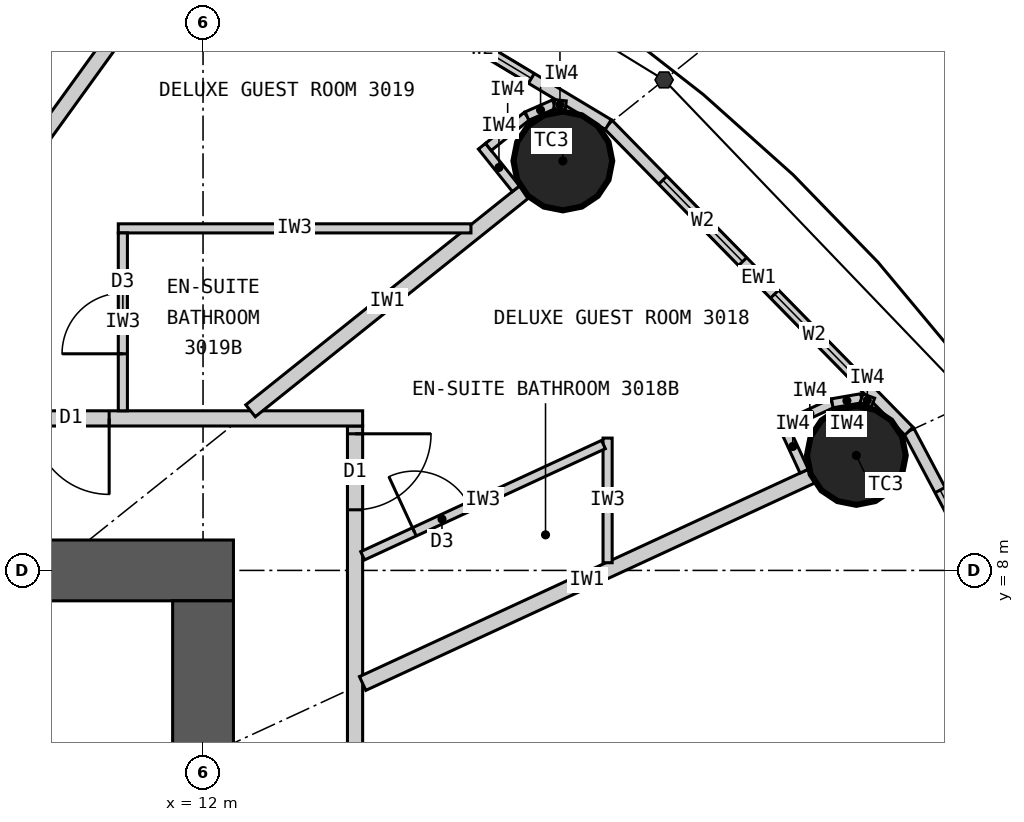
"""IFC4 building model, lengths in metres.
Left out: names, types, materials, properties, quantities, classifications, styles, units other than length and angle.
Written with IfcOpenShell. Run it as: python <this file> out.ifc"""

import sys

from ifc_helpers import new_model, si_unit, direction, frame, frame_2d, origin, origin_2d, place, context, subcontext, project, spatial, rectangle, circle, extrude, element, fill, save


model = new_model("IFC4")
c1 = context("Model", 3, precision=1e-05, world=origin(), true_north=direction((0.0, 1.0)))
c2 = subcontext(c1, "Body", "Model", "MODEL_VIEW")
j1 = project(units=[si_unit("LENGTHUNIT", "METRE"), si_unit("PLANEANGLEUNIT", "RADIAN")], contexts=[c1])
p1 = place(None, origin())
s1 = spatial("IfcSite", under=j1, at=p1, CompositionType="ELEMENT")
p2 = place(p1, origin())
s2 = spatial("IfcBuilding", under=s1, at=p2, CompositionType="ELEMENT")
p3 = place(p2, frame((0.0, 0.0, 118.8)))
s3 = spatial("IfcBuildingStorey", under=s2, at=p3, CompositionType="ELEMENT", Elevation=118.8)
for number, where, z_axis, x_axis in (
    (1, (20.596, 9.513, 0.0), (0.0, 0.0, 1.0), (1.0, 0.0, 0.0)),
    (2, (16.734, 13.387, 0.0), (0.0, 0.0, 1.0), (1.0, 0.0, 0.0)),
):
    element("IfcColumn", number, at=place(p3, frame(where, z_axis=z_axis, x_axis=x_axis)), inside=s3, PredefinedType="COLUMN", context=c2, shape_type="SweptSolid", body=[
        extrude(circle(Radius=0.65, at=origin_2d()), origin(), (0.0, 0.0, 1.0), 3.3),
    ])
p4 = place(p3, frame((-12.4, 8.0, 0.0), z_axis=(0.0, 0.0, 1.0), x_axis=(1.0, 0.0, 0.0)))
e3 = element("IfcWall", 3, at=p4, inside=s3, PredefinedType="SHEAR", context=c2, shape_type="SweptSolid", body=[
    extrude(rectangle(XDim=24.8, YDim=0.8, at=frame_2d((12.4, 0.0))), origin(), (0.0, 0.0, 1.0), 3.3),
])
p5 = place(p4, frame((11.1, 0.0, 0.0)))
e4 = element("IfcOpeningElement", 4, at=p5, cuts=e3, PredefinedType="OPENING", context=c2, shape_type="SweptSolid", body=[
    extrude(rectangle(XDim=1.2, YDim=2.2, at=frame_2d((0.6, 1.1))), frame((0.0, 0.41, 0.0), z_axis=(0.0, -1.0, 0.0), x_axis=(1.0, 0.0, 0.0)), (0.0, 0.0, 1.0), 0.82),
])
p6 = place(p4, frame((18.7, 0.0, 0.0)))
e5 = element("IfcOpeningElement", 5, at=p6, cuts=e3, PredefinedType="OPENING", context=c2, shape_type="SweptSolid", body=[
    extrude(rectangle(XDim=0.9, YDim=2.2, at=frame_2d((0.45, 1.1))), frame((0.0, 0.41, 0.0), z_axis=(0.0, -1.0, 0.0), x_axis=(1.0, 0.0, 0.0)), (0.0, 0.0, 1.0), 0.82),
])
p7 = place(p3, frame((12.0, -7.6, 0.0), z_axis=(0.0, 0.0, 1.0), x_axis=(0.0, 1.0, 0.0)))
e6 = element("IfcWall", 6, at=p7, inside=s3, PredefinedType="SHEAR", context=c2, shape_type="SweptSolid", body=[
    extrude(rectangle(XDim=15.2, YDim=0.8, at=frame_2d((7.6, 0.0))), origin(), (0.0, 0.0, 1.0), 3.3),
])
p8 = place(p7, frame((6.7, 0.0, 0.0)))
e7 = element("IfcOpeningElement", 7, at=p8, cuts=e6, PredefinedType="OPENING", context=c2, shape_type="SweptSolid", body=[
    extrude(rectangle(XDim=1.8, YDim=2.2, at=frame_2d((0.9, 1.1))), frame((0.0, 0.41, 0.0), z_axis=(0.0, -1.0, 0.0), x_axis=(1.0, 0.0, 0.0)), (0.0, 0.0, 1.0), 0.82),
])
p9 = place(p3, frame((23.792, 5.1, 0.0), z_axis=(0.0, 0.0, 1.0), x_axis=(-0.467814388454, 0.883826735257, 0.0)))
e8 = element("IfcWall", 8, at=p9, inside=s3, PredefinedType="ELEMENTEDWALL", context=c2, shape_type="SweptSolid", body=[
    extrude(rectangle(XDim=5.354, YDim=0.15, at=frame_2d((2.677, 0.0))), origin(), (0.0, 0.0, 1.0), 3.12),
])
p10 = place(p9, frame((0.877, 0.0, 0.9)))
e9 = element("IfcOpeningElement", 9, at=p10, cuts=e8, PredefinedType="OPENING", context=c2, shape_type="SweptSolid", body=[
    extrude(rectangle(XDim=1.5, YDim=1.9, at=frame_2d((0.75, 0.95))), frame((0.0, 0.085, 0.0), z_axis=(0.0, -1.0, 0.0), x_axis=(1.0, 0.0, 0.0)), (0.0, 0.0, 1.0), 0.17),
])
p11 = place(p9, frame((2.977, 0.0, 0.9)))
e10 = element("IfcOpeningElement", 10, at=p11, cuts=e8, PredefinedType="OPENING", context=c2, shape_type="SweptSolid", body=[
    extrude(rectangle(XDim=1.5, YDim=1.9, at=frame_2d((0.75, 0.95))), frame((0.0, 0.085, 0.0), z_axis=(0.0, -1.0, 0.0), x_axis=(1.0, 0.0, 0.0)), (0.0, 0.0, 1.0), 0.17),
])
p12 = place(p3, frame((21.287, 9.832, 0.0), z_axis=(0.0, 0.0, 1.0), x_axis=(-0.700136650834, 0.714008872605, 0.0)))
e11 = element("IfcWall", 11, at=p12, inside=s3, PredefinedType="ELEMENTEDWALL", context=c2, shape_type="SweptSolid", body=[
    extrude(rectangle(XDim=5.649, YDim=0.15, at=frame_2d((2.825, 0.0))), origin(), (0.0, 0.0, 1.0), 3.12),
])
p13 = place(p12, frame((1.025, 0.0, 0.9)))
e12 = element("IfcOpeningElement", 12, at=p13, cuts=e11, PredefinedType="OPENING", context=c2, shape_type="SweptSolid", body=[
    extrude(rectangle(XDim=1.5, YDim=1.9, at=frame_2d((0.75, 0.95))), frame((0.0, 0.085, 0.0), z_axis=(0.0, -1.0, 0.0), x_axis=(1.0, 0.0, 0.0)), (0.0, 0.0, 1.0), 0.17),
])
p14 = place(p12, frame((3.125, 0.0, 0.9)))
e13 = element("IfcOpeningElement", 13, at=p14, cuts=e11, PredefinedType="OPENING", context=c2, shape_type="SweptSolid", body=[
    extrude(rectangle(XDim=1.5, YDim=1.9, at=frame_2d((0.75, 0.95))), frame((0.0, 0.085, 0.0), z_axis=(0.0, -1.0, 0.0), x_axis=(1.0, 0.0, 0.0)), (0.0, 0.0, 1.0), 0.17),
])
p15 = place(p3, frame((17.332, 13.866, 0.0), z_axis=(0.0, 0.0, 1.0), x_axis=(-0.857308573723, 0.514802884044, 0.0)))
e14 = element("IfcWall", 14, at=p15, inside=s3, PredefinedType="ELEMENTEDWALL", context=c2, shape_type="SweptSolid", body=[
    extrude(rectangle(XDim=5.961, YDim=0.15, at=frame_2d((2.98, 0.0))), origin(), (0.0, 0.0, 1.0), 3.12),
])
p16 = place(p15, frame((1.181, 0.0, 0.9)))
e15 = element("IfcOpeningElement", 15, at=p16, cuts=e14, PredefinedType="OPENING", context=c2, shape_type="SweptSolid", body=[
    extrude(rectangle(XDim=1.5, YDim=1.9, at=frame_2d((0.75, 0.95))), frame((0.0, 0.085, 0.0), z_axis=(0.0, -1.0, 0.0), x_axis=(1.0, 0.0, 0.0)), (0.0, 0.0, 1.0), 0.17),
])
p17 = place(p15, frame((3.281, 0.0, 0.9)))
e16 = element("IfcOpeningElement", 16, at=p17, cuts=e14, PredefinedType="OPENING", context=c2, shape_type="SweptSolid", body=[
    extrude(rectangle(XDim=1.5, YDim=1.9, at=frame_2d((0.75, 0.95))), frame((0.0, 0.085, 0.0), z_axis=(0.0, -1.0, 0.0), x_axis=(1.0, 0.0, 0.0)), (0.0, 0.0, 1.0), 0.17),
])
p18 = place(p3, frame((14.0, -9.9, 0.0), z_axis=(0.0, 0.0, 1.0), x_axis=(0.0, 1.0, 0.0)))
e17 = element("IfcWall", 17, at=p18, inside=s3, PredefinedType="PARTITIONING", context=c2, shape_type="SweptSolid", body=[
    extrude(rectangle(XDim=19.8, YDim=0.2, at=frame_2d((9.9, 0.0))), origin(), (0.0, 0.0, 1.0), 3.12),
])
p19 = place(p18, frame((2.478, 0.0, 0.0)))
e18 = element("IfcOpeningElement", 18, at=p19, cuts=e17, PredefinedType="OPENING", context=c2, shape_type="SweptSolid", body=[
    extrude(rectangle(XDim=1.0, YDim=2.2, at=frame_2d((0.5, 1.1))), frame((0.0, 0.11, 0.0), z_axis=(0.0, -1.0, 0.0), x_axis=(1.0, 0.0, 0.0)), (0.0, 0.0, 1.0), 0.22),
])
p20 = place(p18, frame((8.838, 0.0, 0.0)))
e19 = element("IfcOpeningElement", 19, at=p20, cuts=e17, PredefinedType="OPENING", context=c2, shape_type="SweptSolid", body=[
    extrude(rectangle(XDim=1.0, YDim=2.2, at=frame_2d((0.5, 1.1))), frame((0.0, 0.11, 0.0), z_axis=(0.0, -1.0, 0.0), x_axis=(1.0, 0.0, 0.0)), (0.0, 0.0, 1.0), 0.22),
])
p21 = place(p18, frame((13.742, 0.0, 0.0)))
e20 = element("IfcOpeningElement", 20, at=p21, cuts=e17, PredefinedType="OPENING", context=c2, shape_type="SweptSolid", body=[
    extrude(rectangle(XDim=1.0, YDim=2.2, at=frame_2d((0.5, 1.1))), frame((0.0, 0.11, 0.0), z_axis=(0.0, -1.0, 0.0), x_axis=(1.0, 0.0, 0.0)), (0.0, 0.0, 1.0), 0.22),
])
p22 = place(p18, frame((18.698, 0.0, 0.0)))
e21 = element("IfcOpeningElement", 21, at=p22, cuts=e17, PredefinedType="OPENING", context=c2, shape_type="SweptSolid", body=[
    extrude(rectangle(XDim=1.0, YDim=2.2, at=frame_2d((0.5, 1.1))), frame((0.0, 0.11, 0.0), z_axis=(0.0, -1.0, 0.0), x_axis=(1.0, 0.0, 0.0)), (0.0, 0.0, 1.0), 0.22),
])
p23 = place(p3, frame((3.283, 10.0, 0.0), z_axis=(0.0, 0.0, 1.0), x_axis=(1.0, 0.0, 0.0)))
e22 = element("IfcWall", 22, at=p23, inside=s3, PredefinedType="PARTITIONING", context=c2, shape_type="SweptSolid", body=[
    extrude(rectangle(XDim=10.817, YDim=0.2, at=frame_2d((5.409, 0.0))), origin(), (0.0, 0.0, 1.0), 3.12),
])
p24 = place(p23, frame((6.482, 0.0, 0.0)))
e23 = element("IfcOpeningElement", 23, at=p24, cuts=e22, PredefinedType="OPENING", context=c2, shape_type="SweptSolid", body=[
    extrude(rectangle(XDim=1.0, YDim=2.2, at=frame_2d((0.5, 1.1))), frame((0.0, 0.11, 0.0), z_axis=(0.0, -1.0, 0.0), x_axis=(1.0, 0.0, 0.0)), (0.0, 0.0, 1.0), 0.22),
])
p25 = place(p3, frame((14.1, 6.512, 0.0), z_axis=(0.0, 0.0, 1.0), x_axis=(0.907833019998, 0.419331858797, 0.0)))
e24 = element("IfcWall", 24, at=p25, inside=s3, PredefinedType="PARTITIONING", context=c2, shape_type="SweptSolid", body=[
    extrude(rectangle(XDim=6.505, YDim=0.2, at=frame_2d((3.252, 0.0))), origin(), (0.0, 0.0, 1.0), 2.27),
])
p26 = place(p3, frame((12.625, 10.1, 0.0), z_axis=(0.0, 0.0, 1.0), x_axis=(0.780863644897, 0.624701503182, 0.0)))
e25 = element("IfcWall", 25, at=p26, inside=s3, PredefinedType="PARTITIONING", context=c2, shape_type="SweptSolid", body=[
    extrude(rectangle(XDim=4.612, YDim=0.2, at=frame_2d((2.306, 0.0))), origin(), (0.0, 0.0, 1.0), 2.37),
])
p27 = place(p3, frame((7.289, 10.1, 0.0), z_axis=(0.0, 0.0, 1.0), x_axis=(0.585217367024, 0.81087645997, 0.0)))
e26 = element("IfcWall", 26, at=p27, inside=s3, PredefinedType="PARTITIONING", context=c2, shape_type="SweptSolid", body=[
    extrude(rectangle(XDim=7.016, YDim=0.2, at=frame_2d((3.508, 0.0))), origin(), (0.0, 0.0, 1.0), 2.37),
])
p28 = place(p3, frame((17.323, 8.101, 0.0), z_axis=(0.0, 0.0, 1.0), x_axis=(0.0, 1.0, 0.0)))
e27 = element("IfcWall", 27, at=p28, inside=s3, PredefinedType="PARTITIONING", context=c2, shape_type="SweptSolid", body=[
    extrude(rectangle(XDim=1.64, YDim=0.12, at=frame_2d((0.82, 0.0))), origin(), (0.0, 0.0, 1.0), 3.12),
])
p29 = place(p3, frame((14.1, 8.193, 0.0), z_axis=(0.0, 0.0, 1.0), x_axis=(0.907836493557, 0.419324338628, 0.0)))
e28 = element("IfcWall", 28, at=p29, inside=s3, PredefinedType="PARTITIONING", context=c2, shape_type="SweptSolid", body=[
    extrude(rectangle(XDim=3.49, YDim=0.12, at=frame_2d((1.745, 0.0))), origin(), (0.0, 0.0, 1.0), 3.12),
])
p30 = place(p29, frame((0.75, 0.0, 0.0)))
e29 = element("IfcOpeningElement", 29, at=p30, cuts=e28, PredefinedType="OPENING", context=c2, shape_type="SweptSolid", body=[
    extrude(rectangle(XDim=0.8, YDim=2.1, at=frame_2d((0.4, 1.05))), frame((0.0, 0.07, 0.0), z_axis=(0.0, -1.0, 0.0), x_axis=(1.0, 0.0, 0.0)), (0.0, 0.0, 1.0), 0.14),
])
p31 = place(p3, frame((15.525, 12.5, 0.0), z_axis=(0.0, 0.0, 1.0), x_axis=(-1.0, 0.0, 0.0)))
e30 = element("IfcWall", 30, at=p31, inside=s3, PredefinedType="PARTITIONING", context=c2, shape_type="SweptSolid", body=[
    extrude(rectangle(XDim=4.64, YDim=0.12, at=frame_2d((2.32, 0.0))), origin(), (0.0, 0.0, 1.0), 3.12),
])
p32 = place(p3, frame((10.945, 10.1, 0.0), z_axis=(0.0, 0.0, 1.0), x_axis=(0.0, 1.0, 0.0)))
e31 = element("IfcWall", 31, at=p32, inside=s3, PredefinedType="PARTITIONING", context=c2, shape_type="SweptSolid", body=[
    extrude(rectangle(XDim=2.34, YDim=0.12, at=frame_2d((1.17, 0.0))), origin(), (0.0, 0.0, 1.0), 3.12),
])
p33 = place(p32, frame((0.75, 0.0, 0.0)))
e32 = element("IfcOpeningElement", 32, at=p33, cuts=e31, PredefinedType="OPENING", context=c2, shape_type="SweptSolid", body=[
    extrude(rectangle(XDim=0.8, YDim=2.1, at=frame_2d((0.4, 1.05))), frame((0.0, 0.07, 0.0), z_axis=(0.0, -1.0, 0.0), x_axis=(1.0, 0.0, 0.0)), (0.0, 0.0, 1.0), 0.14),
])
p34 = place(p3, frame((19.909, 9.306, 0.0), z_axis=(0.0, 0.0, 1.0), x_axis=(-0.419296148934, 0.90784951368, 0.0)))
e33 = element("IfcWall", 33, at=p34, inside=s3, PredefinedType="PARTITIONING", context=c2, shape_type="SweptSolid", body=[
    extrude(rectangle(XDim=0.716, YDim=0.12, at=frame_2d((0.358, 0.0))), origin(), (0.0, 0.0, 1.0), 3.12),
])
p35 = place(p3, frame((19.689, 9.926, 0.0), z_axis=(0.0, 0.0, 1.0), x_axis=(0.907893409272, 0.419201094227, 0.0)))
e34 = element("IfcWall", 34, at=p35, inside=s3, PredefinedType="PARTITIONING", context=c2, shape_type="SweptSolid", body=[
    extrude(rectangle(XDim=0.65, YDim=0.12, at=frame_2d((0.325, 0.0))), origin(), (0.0, 0.0, 1.0), 3.12),
])
p36 = place(p3, frame((20.279, 10.199, 0.0), z_axis=(0.0, 0.0, 1.0), x_axis=(0.985380740712, 0.170366651181, 0.0)))
e35 = element("IfcWall", 35, at=p36, inside=s3, PredefinedType="PARTITIONING", context=c2, shape_type="SweptSolid", body=[
    extrude(rectangle(XDim=0.391, YDim=0.12, at=frame_2d((0.196, 0.0))), origin(), (0.0, 0.0, 1.0), 3.12),
])
p37 = place(p3, frame((20.664, 10.265, 0.0), z_axis=(0.0, 0.0, 1.0), x_axis=(0.938058651481, -0.346476501918, 0.0)))
e36 = element("IfcWall", 36, at=p37, inside=s3, PredefinedType="PARTITIONING", context=c2, shape_type="SweptSolid", body=[
    extrude(rectangle(XDim=0.161, YDim=0.12, at=frame_2d((0.081, 0.0))), origin(), (0.0, 0.0, 1.0), 3.12),
])
p38 = place(p3, frame((16.117, 13.022, 0.0), z_axis=(0.0, 0.0, 1.0), x_axis=(-0.62465344249, 0.780902091677, 0.0)))
e37 = element("IfcWall", 37, at=p38, inside=s3, PredefinedType="PARTITIONING", context=c2, shape_type="SweptSolid", body=[
    extrude(rectangle(XDim=0.716, YDim=0.12, at=frame_2d((0.358, 0.0))), origin(), (0.0, 0.0, 1.0), 3.12),
])
p39 = place(p3, frame((15.754, 13.571, 0.0), z_axis=(0.0, 0.0, 1.0), x_axis=(0.780905453553, 0.624649239663, 0.0)))
e38 = element("IfcWall", 38, at=p39, inside=s3, PredefinedType="PARTITIONING", context=c2, shape_type="SweptSolid", body=[
    extrude(rectangle(XDim=0.65, YDim=0.12, at=frame_2d((0.325, 0.0))), origin(), (0.0, 0.0, 1.0), 3.12),
])
p40 = place(p3, frame((16.262, 13.977, 0.0), z_axis=(0.0, 0.0, 1.0), x_axis=(0.915985403703, 0.401211590314, 0.0)))
e39 = element("IfcWall", 39, at=p40, inside=s3, PredefinedType="PARTITIONING", context=c2, shape_type="SweptSolid", body=[
    extrude(rectangle(XDim=0.391, YDim=0.12, at=frame_2d((0.196, 0.0))), origin(), (0.0, 0.0, 1.0), 3.12),
])
p41 = place(p3, frame((16.62, 14.134, 0.0), z_axis=(0.0, 0.0, 1.0), x_axis=(0.993941871493, -0.109907033867, 0.0)))
e40 = element("IfcWall", 40, at=p41, inside=s3, PredefinedType="PARTITIONING", context=c2, shape_type="SweptSolid", body=[
    extrude(rectangle(XDim=0.153, YDim=0.12, at=frame_2d((0.077, 0.0))), origin(), (0.0, 0.0, 1.0), 3.12),
])
p42 = place(p11, origin())
e41 = element("IfcWindow", 41, at=p42, inside=s3, PartitioningType="SINGLE_PANEL", PredefinedType="WINDOW", context=c2, shape_type="SweptSolid", body=[
    extrude(rectangle(XDim=1.5, YDim=1.9, at=frame_2d((0.75, 0.95))), frame((0.0, 0.03, 0.0), z_axis=(0.0, -1.0, 0.0), x_axis=(1.0, 0.0, 0.0)), (0.0, 0.0, 1.0), 0.06),
])
fill(e10, e41)
p43 = place(p13, origin())
e42 = element("IfcWindow", 42, at=p43, inside=s3, PartitioningType="SINGLE_PANEL", PredefinedType="WINDOW", context=c2, shape_type="SweptSolid", body=[
    extrude(rectangle(XDim=1.5, YDim=1.9, at=frame_2d((0.75, 0.95))), frame((0.0, 0.03, 0.0), z_axis=(0.0, -1.0, 0.0), x_axis=(1.0, 0.0, 0.0)), (0.0, 0.0, 1.0), 0.06),
])
fill(e12, e42)
p44 = place(p14, origin())
e43 = element("IfcWindow", 43, at=p44, inside=s3, PartitioningType="SINGLE_PANEL", PredefinedType="WINDOW", context=c2, shape_type="SweptSolid", body=[
    extrude(rectangle(XDim=1.5, YDim=1.9, at=frame_2d((0.75, 0.95))), frame((0.0, 0.03, 0.0), z_axis=(0.0, -1.0, 0.0), x_axis=(1.0, 0.0, 0.0)), (0.0, 0.0, 1.0), 0.06),
])
fill(e13, e43)
p45 = place(p16, origin())
e44 = element("IfcWindow", 44, at=p45, inside=s3, PartitioningType="SINGLE_PANEL", PredefinedType="WINDOW", context=c2, shape_type="SweptSolid", body=[
    extrude(rectangle(XDim=1.5, YDim=1.9, at=frame_2d((0.75, 0.95))), frame((0.0, 0.03, 0.0), z_axis=(0.0, -1.0, 0.0), x_axis=(1.0, 0.0, 0.0)), (0.0, 0.0, 1.0), 0.06),
])
fill(e15, e44)
p46 = place(p30, origin())
e45 = element("IfcDoor", 45, at=p46, inside=s3, OperationType="SINGLE_SWING_LEFT", PredefinedType="DOOR", context=c2, shape_type="SweptSolid", body=[
    extrude(rectangle(XDim=0.8, YDim=2.1, at=frame_2d((0.4, 1.05))), frame((0.0, 0.025, 0.0), z_axis=(0.0, -1.0, 0.0), x_axis=(1.0, 0.0, 0.0)), (0.0, 0.0, 1.0), 0.05),
])
fill(e29, e45)
p47 = place(p22, origin())
e46 = element("IfcDoor", 46, at=p47, inside=s3, OperationType="SINGLE_SWING_RIGHT", PredefinedType="DOOR", context=c2, shape_type="SweptSolid", body=[
    extrude(rectangle(XDim=1.0, YDim=2.2, at=frame_2d((0.5, 1.1))), frame((0.0, 0.025, 0.0), z_axis=(0.0, -1.0, 0.0), x_axis=(1.0, 0.0, 0.0)), (0.0, 0.0, 1.0), 0.05),
])
fill(e21, e46)
p48 = place(p33, origin())
e47 = element("IfcDoor", 47, at=p48, inside=s3, OperationType="SINGLE_SWING_LEFT", PredefinedType="DOOR", context=c2, shape_type="SweptSolid", body=[
    extrude(rectangle(XDim=0.8, YDim=2.1, at=frame_2d((0.4, 1.05))), frame((0.0, 0.025, 0.0), z_axis=(0.0, -1.0, 0.0), x_axis=(1.0, 0.0, 0.0)), (0.0, 0.0, 1.0), 0.05),
])
fill(e32, e47)
p49 = place(p24, origin())
e48 = element("IfcDoor", 48, at=p49, inside=s3, OperationType="SINGLE_SWING_RIGHT", PredefinedType="DOOR", context=c2, shape_type="SweptSolid", body=[
    extrude(rectangle(XDim=1.0, YDim=2.2, at=frame_2d((0.5, 1.1))), frame((0.0, 0.025, 0.0), z_axis=(0.0, -1.0, 0.0), x_axis=(1.0, 0.0, 0.0)), (0.0, 0.0, 1.0), 0.05),
])
fill(e23, e48)
save(model, sys.argv[1])
